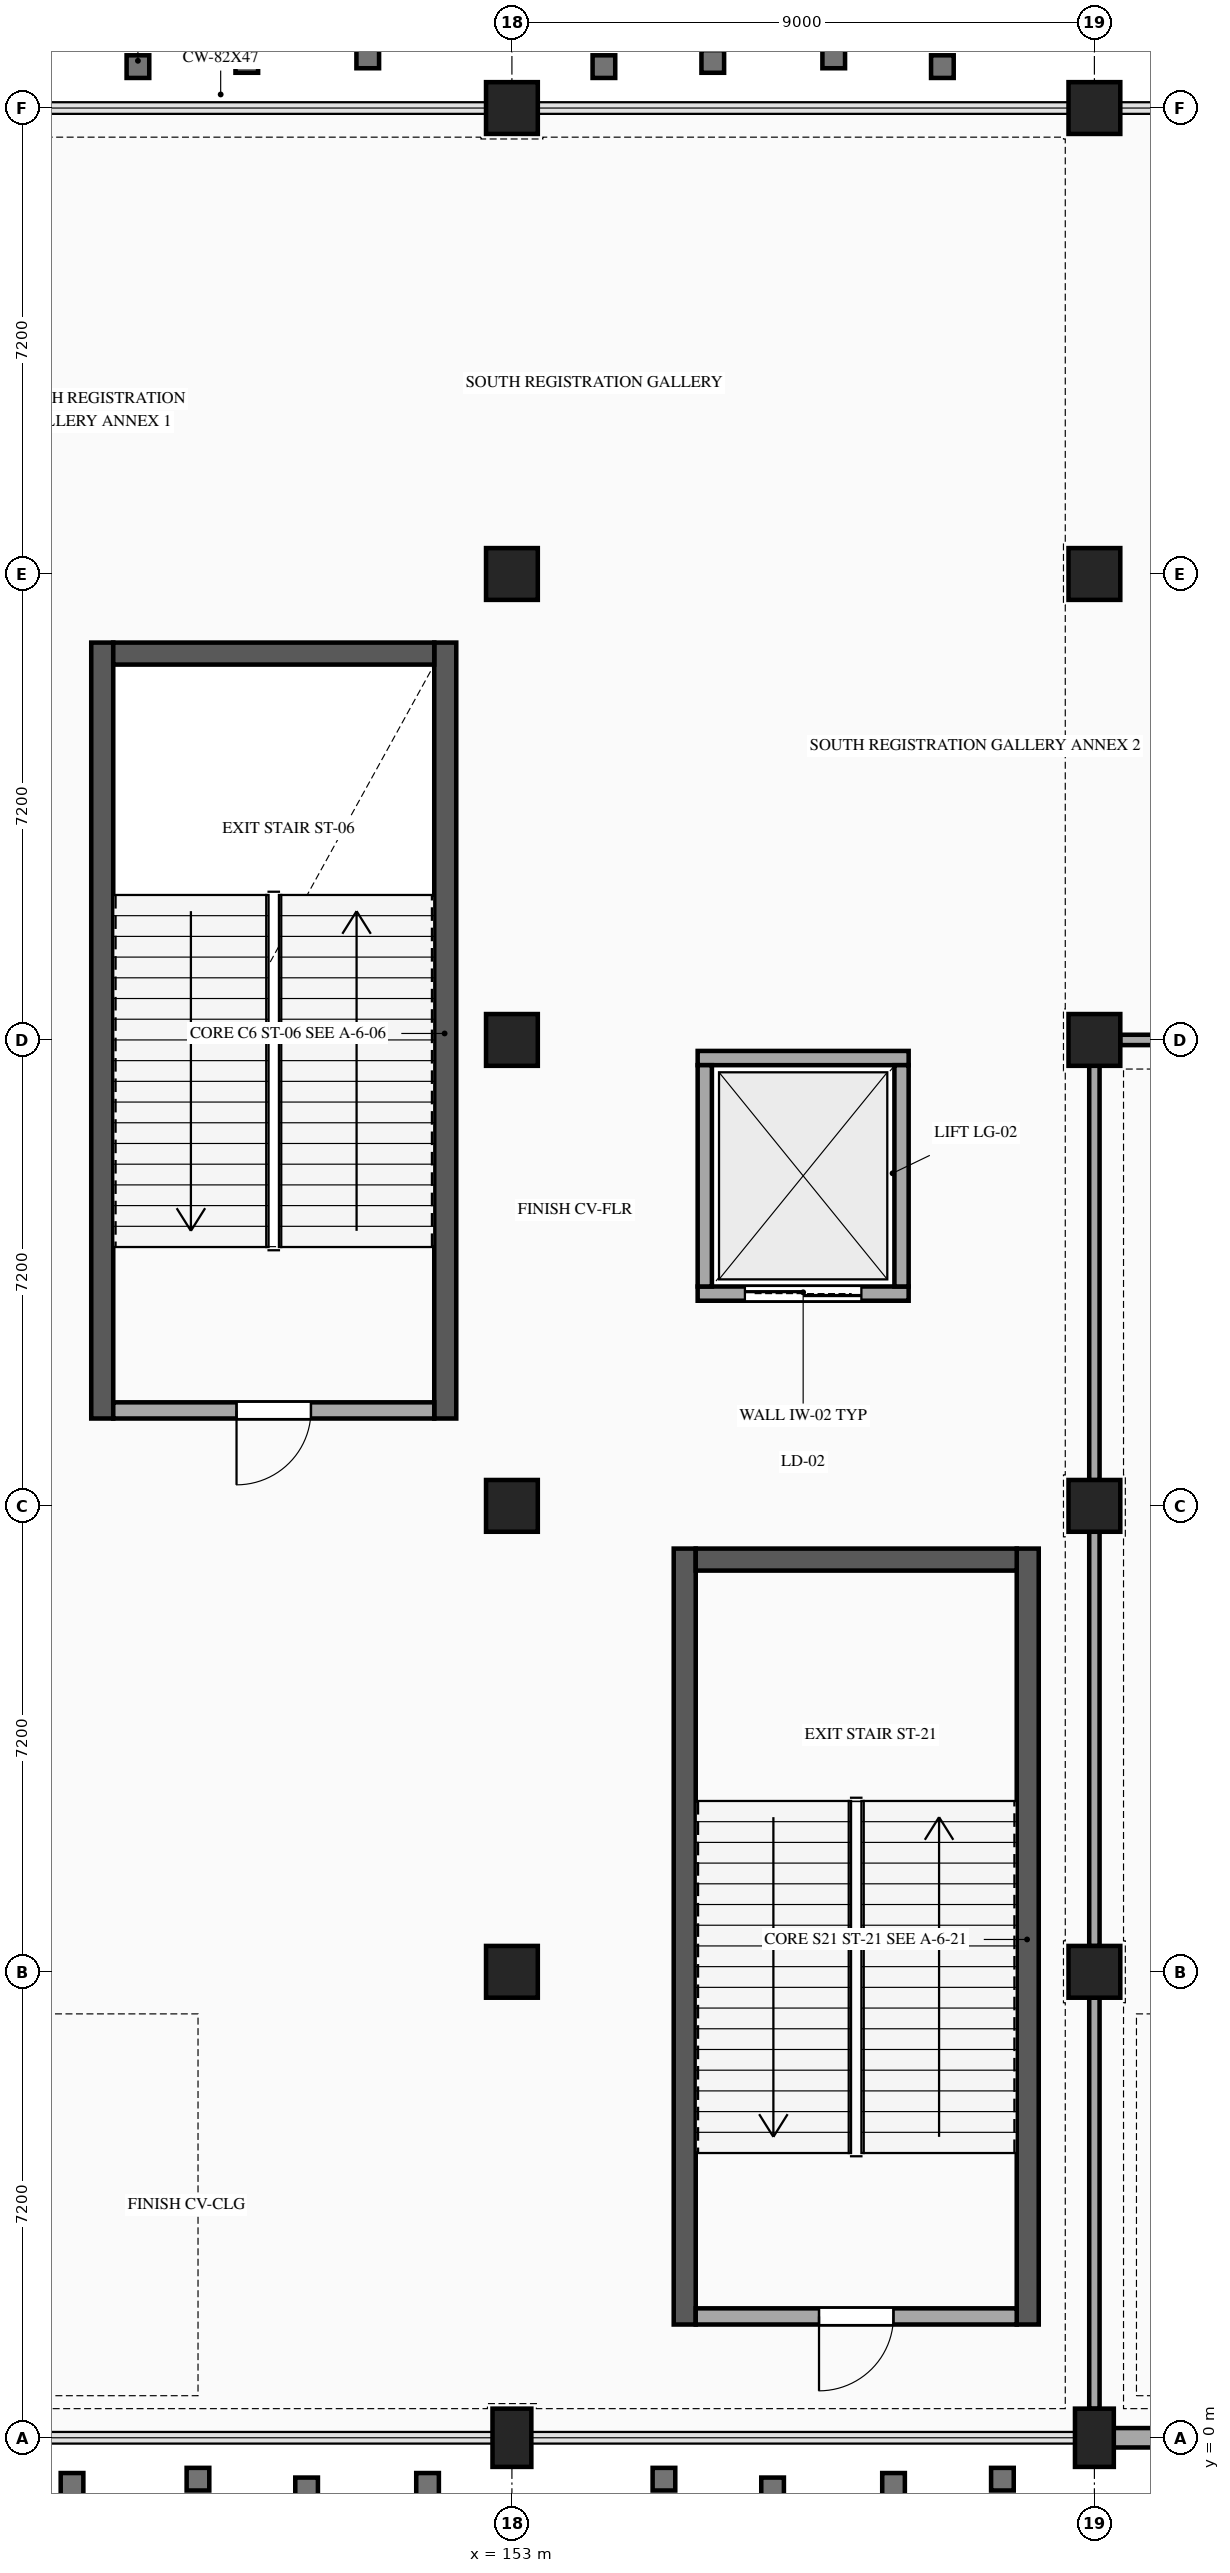
"""IFC4 building model, lengths in metres.
Left out: names, types, materials, properties, quantities, classifications, styles, units other than length and angle.
Written with IfcOpenShell. Run it as: python <this file> out.ifc"""

import sys

from ifc_helpers import new_model, si_unit, direction, frame, frame_2d, origin, origin_2d, place, context, subcontext, project, spatial, rectangle, extrude, element, fill, save


model = new_model("IFC4")
c1 = context("Model", 3, precision=1e-05, world=origin(), true_north=direction((0.0, 1.0)))
c2 = subcontext(c1, "Body", "Model", "MODEL_VIEW")
j1 = project(units=[si_unit("LENGTHUNIT", "METRE"), si_unit("PLANEANGLEUNIT", "RADIAN")], contexts=[c1])
p1 = place(None, origin())
s1 = spatial("IfcSite", under=j1, at=p1, CompositionType="ELEMENT")
p2 = place(p1, origin())
s2 = spatial("IfcBuilding", under=s1, at=p2, CompositionType="ELEMENT")
p3 = place(p2, origin())
s3 = spatial("IfcBuildingStorey", under=s2, at=p3, CompositionType="ELEMENT", Elevation=0.0)
p4 = place(p3, frame((153.0, 0.0, 0.0), z_axis=(0.0, 0.0, 1.0), x_axis=(1.0, 0.0, 0.0)))
e1 = element("IfcColumn", 1, at=p4, inside=s3, PredefinedType="COLUMN", context=c2, shape_type="SweptSolid", body=[
    extrude(rectangle(XDim=0.6, YDim=0.9, at=origin_2d()), origin(), (0.0, 0.0, 1.0), 5.4),
])
for number, where, z_axis, x_axis in (
    (2, (153.0, 7.2, 0.0), (0.0, 0.0, 1.0), (1.0, 0.0, 0.0)),
    (3, (153.0, 14.4, 0.0), (0.0, 0.0, 1.0), (1.0, 0.0, 0.0)),
    (4, (153.0, 21.6, 0.0), (0.0, 0.0, 1.0), (1.0, 0.0, 0.0)),
    (5, (153.0, 28.8, 0.0), (0.0, 0.0, 1.0), (1.0, 0.0, 0.0)),
    (6, (153.0, 36.0, 0.0), (0.0, 0.0, 1.0), (1.0, 0.0, 0.0)),
):
    element("IfcColumn", number, at=place(p3, frame(where, z_axis=z_axis, x_axis=x_axis)), inside=s3, PredefinedType="COLUMN", context=c2, shape_type="SweptSolid", body=[
        extrude(rectangle(XDim=0.8, YDim=0.8, at=origin_2d()), origin(), (0.0, 0.0, 1.0), 5.4),
    ])
p5 = place(p3, frame((162.0, 0.0, 0.0), z_axis=(0.0, 0.0, 1.0), x_axis=(1.0, 0.0, 0.0)))
e7 = element("IfcColumn", 7, at=p5, inside=s3, PredefinedType="COLUMN", context=c2, shape_type="SweptSolid", body=[
    extrude(rectangle(XDim=0.6, YDim=0.9, at=origin_2d()), origin(), (0.0, 0.0, 1.0), 5.4),
])
for number, where, z_axis, x_axis in (
    (8, (162.0, 7.2, 0.0), (0.0, 0.0, 1.0), (1.0, 0.0, 0.0)),
    (9, (162.0, 14.4, 0.0), (0.0, 0.0, 1.0), (1.0, 0.0, 0.0)),
    (10, (162.0, 21.6, 0.0), (0.0, 0.0, 1.0), (1.0, 0.0, 0.0)),
    (11, (162.0, 28.8, 0.0), (0.0, 0.0, 1.0), (1.0, 0.0, 0.0)),
    (12, (162.0, 36.0, 0.0), (0.0, 0.0, 1.0), (1.0, 0.0, 0.0)),
):
    element("IfcColumn", number, at=place(p3, frame(where, z_axis=z_axis, x_axis=x_axis)), inside=s3, PredefinedType="COLUMN", context=c2, shape_type="SweptSolid", body=[
        extrude(rectangle(XDim=0.8, YDim=0.8, at=origin_2d()), origin(), (0.0, 0.0, 1.0), 5.4),
    ])
for number, where, z_axis, x_axis in (
    (13, (146.67, 15.75, 0.0), (0.0, 0.0, 1.0), (0.0, 1.0, 0.0)),
    (14, (151.97, 27.74, 0.0), (0.0, 0.0, 1.0), (0.0, -1.0, 0.0)),
):
    element("IfcWall", number, at=place(p3, frame(where, z_axis=z_axis, x_axis=x_axis)), inside=s3, PredefinedType="SHEAR", context=c2, shape_type="SweptSolid", body=[
        extrude(rectangle(XDim=11.99, YDim=0.34, at=frame_2d((5.995, 0.0))), origin(), (0.0, 0.0, 1.0), 5.12),
    ])
p6 = place(p3, frame((146.84, 27.57, 0.0), z_axis=(0.0, 0.0, 1.0), x_axis=(1.0, 0.0, 0.0)))
e15 = element("IfcWall", 15, at=p6, inside=s3, PredefinedType="SHEAR", context=c2, shape_type="SweptSolid", body=[
    extrude(rectangle(XDim=4.96, YDim=0.34, at=frame_2d((2.48, 0.0))), origin(), (0.0, 0.0, 1.0), 5.12),
])
for number, where, z_axis, x_axis in (
    (16, (155.67, 1.75, 0.0), (0.0, 0.0, 1.0), (0.0, 1.0, 0.0)),
    (17, (160.97, 13.74, 0.0), (0.0, 0.0, 1.0), (0.0, -1.0, 0.0)),
):
    element("IfcWall", number, at=place(p3, frame(where, z_axis=z_axis, x_axis=x_axis)), inside=s3, PredefinedType="SHEAR", context=c2, shape_type="SweptSolid", body=[
        extrude(rectangle(XDim=11.99, YDim=0.34, at=frame_2d((5.995, 0.0))), origin(), (0.0, 0.0, 1.0), 5.12),
    ])
p7 = place(p3, frame((155.84, 13.57, 0.0), z_axis=(0.0, 0.0, 1.0), x_axis=(1.0, 0.0, 0.0)))
e18 = element("IfcWall", 18, at=p7, inside=s3, PredefinedType="SHEAR", context=c2, shape_type="SweptSolid", body=[
    extrude(rectangle(XDim=4.96, YDim=0.34, at=frame_2d((2.48, 0.0))), origin(), (0.0, 0.0, 1.0), 5.12),
])
p8 = place(p3, frame((170.702, 0.0, 0.0), z_axis=(0.0, 0.0, 1.0), x_axis=(-1.0, 0.0, 0.0)))
e19 = element("IfcWall", 19, at=p8, inside=s3, PredefinedType="STANDARD", context=c2, shape_type="SweptSolid", body=[
    extrude(rectangle(XDim=8.404, YDim=0.3, at=frame_2d((4.202, 0.0))), origin(), (0.0, 0.0, 1.0), 4.747),
])
p9 = place(p3, frame((151.8, 15.875, 0.0), z_axis=(0.0, 0.0, 1.0), x_axis=(-1.0, 0.0, 0.0)))
e20 = element("IfcWall", 20, at=p9, inside=s3, PredefinedType="STANDARD", context=c2, shape_type="SweptSolid", body=[
    extrude(rectangle(XDim=4.96, YDim=0.25, at=frame_2d((2.48, 0.0))), origin(), (0.0, 0.0, 1.0), 5.08),
])
p10 = place(p9, frame((1.905, 0.0, 0.0)))
e21 = element("IfcOpeningElement", 21, at=p10, cuts=e20, PredefinedType="OPENING", context=c2, shape_type="SweptSolid", body=[
    extrude(rectangle(XDim=1.15, YDim=2.2, at=frame_2d((0.575, 1.1))), frame((0.0, 0.135, 0.0), z_axis=(0.0, -1.0, 0.0), x_axis=(1.0, 0.0, 0.0)), (0.0, 0.0, 1.0), 0.27),
])
p11 = place(p3, frame((155.87, 17.68, 0.0), z_axis=(0.0, 0.0, 1.0), x_axis=(1.0, 0.0, 0.0)))
e22 = element("IfcWall", 22, at=p11, inside=s3, PredefinedType="STANDARD", context=c2, shape_type="SweptSolid", body=[
    extrude(rectangle(XDim=3.26, YDim=0.22, at=frame_2d((1.63, 0.0))), origin(), (0.0, 0.0, 1.0), 4.747),
])
p12 = place(p11, frame((0.73, 0.0, 0.0)))
e23 = element("IfcOpeningElement", 23, at=p12, cuts=e22, PredefinedType="OPENING", context=c2, shape_type="SweptSolid", body=[
    extrude(rectangle(XDim=1.8, YDim=2.35, at=frame_2d((0.9, 1.175))), frame((0.0, 0.12, 0.0), z_axis=(0.0, -1.0, 0.0), x_axis=(1.0, 0.0, 0.0)), (0.0, 0.0, 1.0), 0.24),
])
p13 = place(p3, frame((159.13, 21.32, 0.0), z_axis=(0.0, 0.0, 1.0), x_axis=(-1.0, 0.0, 0.0)))
e24 = element("IfcWall", 24, at=p13, inside=s3, PredefinedType="STANDARD", context=c2, shape_type="SweptSolid", body=[
    extrude(rectangle(XDim=3.26, YDim=0.22, at=frame_2d((1.63, 0.0))), origin(), (0.0, 0.0, 1.0), 4.747),
])
for number, where, z_axis, x_axis in (
    (25, (155.98, 21.21, 0.0), (0.0, 0.0, 1.0), (0.0, -1.0, 0.0)),
    (26, (159.02, 17.79, 0.0), (0.0, 0.0, 1.0), (0.0, 1.0, 0.0)),
):
    element("IfcWall", number, at=place(p3, frame(where, z_axis=z_axis, x_axis=x_axis)), inside=s3, PredefinedType="STANDARD", context=c2, shape_type="SweptSolid", body=[
        extrude(rectangle(XDim=3.42, YDim=0.22, at=frame_2d((1.71, 0.0))), origin(), (0.0, 0.0, 1.0), 4.747),
    ])
p14 = place(p3, frame((160.8, 1.875, 0.0), z_axis=(0.0, 0.0, 1.0), x_axis=(-1.0, 0.0, 0.0)))
e27 = element("IfcWall", 27, at=p14, inside=s3, PredefinedType="STANDARD", context=c2, shape_type="SweptSolid", body=[
    extrude(rectangle(XDim=4.96, YDim=0.25, at=frame_2d((2.48, 0.0))), origin(), (0.0, 0.0, 1.0), 5.08),
])
p15 = place(p14, frame((1.905, 0.0, 0.0)))
e28 = element("IfcOpeningElement", 28, at=p15, cuts=e27, PredefinedType="OPENING", context=c2, shape_type="SweptSolid", body=[
    extrude(rectangle(XDim=1.15, YDim=2.2, at=frame_2d((0.575, 1.1))), frame((0.0, 0.135, 0.0), z_axis=(0.0, -1.0, 0.0), x_axis=(1.0, 0.0, 0.0)), (0.0, 0.0, 1.0), 0.27),
])
p16 = place(p3, frame((162.398, 21.6, 0.0), z_axis=(0.0, 0.0, 1.0), x_axis=(1.0, 0.0, 0.0)))
e29 = element("IfcWall", 29, at=p16, inside=s3, PredefinedType="PARTITIONING", context=c2, shape_type="SweptSolid", body=[
    extrude(rectangle(XDim=8.229, YDim=0.16, at=frame_2d((4.115, 0.0))), origin(), (0.0, 0.0, 1.0), 4.264),
])
p17 = place(p16, frame((3.215, 0.0, 0.0)))
e30 = element("IfcOpeningElement", 30, at=p17, cuts=e29, PredefinedType="OPENING", context=c2, shape_type="SweptSolid", body=[
    extrude(rectangle(XDim=1.8, YDim=2.25, at=frame_2d((0.9, 1.125))), frame((0.0, 0.09, 0.0), z_axis=(0.0, -1.0, 0.0), x_axis=(1.0, 0.0, 0.0)), (0.0, 0.0, 1.0), 0.18),
])
p18 = place(p3, frame((162.0, 0.448, 0.0), z_axis=(0.0, 0.0, 1.0), x_axis=(0.0, 1.0, 0.0)))
e31 = element("IfcWall", 31, at=p18, inside=s3, PredefinedType="PARTITIONING", context=c2, shape_type="SweptSolid", body=[
    extrude(rectangle(XDim=6.354, YDim=0.16, at=frame_2d((3.177, 0.0))), origin(), (0.0, 0.0, 1.0), 4.264),
])
p19 = place(p3, frame((162.0, 7.598, 0.0), z_axis=(0.0, 0.0, 1.0), x_axis=(0.0, 1.0, 0.0)))
e32 = element("IfcWall", 32, at=p19, inside=s3, PredefinedType="PARTITIONING", context=c2, shape_type="SweptSolid", body=[
    extrude(rectangle(XDim=6.404, YDim=0.16, at=frame_2d((3.202, 0.0))), origin(), (0.0, 0.0, 1.0), 4.264),
])
p20 = place(p3, frame((162.0, 14.798, 0.0), z_axis=(0.0, 0.0, 1.0), x_axis=(0.0, 1.0, 0.0)))
e33 = element("IfcWall", 33, at=p20, inside=s3, PredefinedType="PARTITIONING", context=c2, shape_type="SweptSolid", body=[
    extrude(rectangle(XDim=6.404, YDim=0.16, at=frame_2d((3.202, 0.0))), origin(), (0.0, 0.0, 1.0), 4.264),
])
p21 = place(p10, origin())
e34 = element("IfcDoor", 34, at=p21, inside=s3, OperationType="SINGLE_SWING_RIGHT", PredefinedType="DOOR", context=c2, shape_type="SweptSolid", body=[
    extrude(rectangle(XDim=1.15, YDim=2.2, at=frame_2d((0.575, 1.1))), frame((0.0, 0.025, 0.0), z_axis=(0.0, -1.0, 0.0), x_axis=(1.0, 0.0, 0.0)), (0.0, 0.0, 1.0), 0.05),
])
fill(e21, e34)
p22 = place(p12, origin())
e35 = element("IfcDoor", 35, at=p22, inside=s3, OperationType="DOUBLE_DOOR_SLIDING", PredefinedType="DOOR", context=c2, shape_type="SweptSolid", body=[
    extrude(rectangle(XDim=1.8, YDim=2.35, at=frame_2d((0.9, 1.175))), frame((0.0, 0.025, 0.0), z_axis=(0.0, -1.0, 0.0), x_axis=(1.0, 0.0, 0.0)), (0.0, 0.0, 1.0), 0.05),
])
fill(e23, e35)
p23 = place(p15, origin())
e36 = element("IfcDoor", 36, at=p23, inside=s3, OperationType="SINGLE_SWING_RIGHT", PredefinedType="DOOR", context=c2, shape_type="SweptSolid", body=[
    extrude(rectangle(XDim=1.15, YDim=2.2, at=frame_2d((0.575, 1.1))), frame((0.0, 0.025, 0.0), z_axis=(0.0, -1.0, 0.0), x_axis=(1.0, 0.0, 0.0)), (0.0, 0.0, 1.0), 0.05),
])
fill(e28, e36)
save(model, sys.argv[1])
